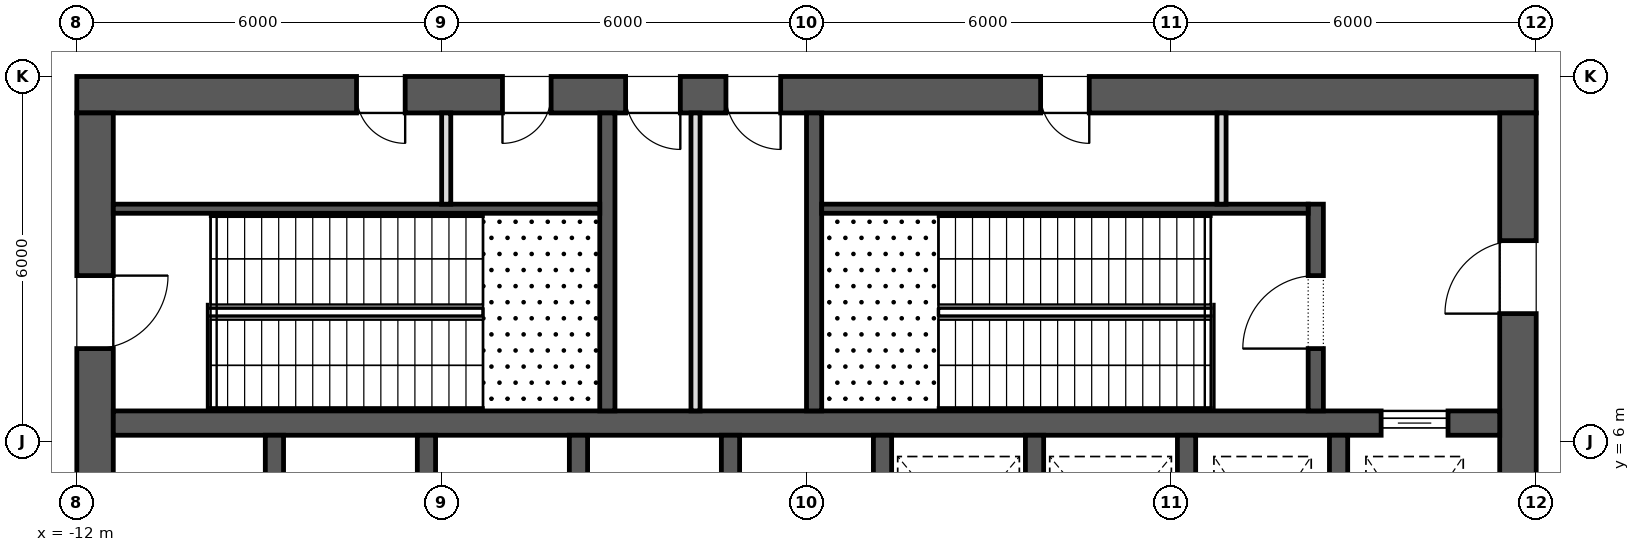
"""IFC4 building model, lengths in metres.
Left out: names, types, materials, properties, quantities, classifications, styles, units other than length and angle.
Written with IfcOpenShell. Run it as: python <this file> out.ifc"""

import sys

from ifc_helpers import new_model, si_unit, direction, frame, frame_2d, origin, place, context, subcontext, project, spatial, rectangle, extrude, element, fill, save


model = new_model("IFC4")
c1 = context("Model", 3, precision=1e-05, world=origin(), true_north=direction((0.0, 1.0)))
c2 = subcontext(c1, "Body", "Model", "MODEL_VIEW")
j1 = project(units=[si_unit("LENGTHUNIT", "METRE"), si_unit("PLANEANGLEUNIT", "RADIAN")], contexts=[c1])
p1 = place(None, origin())
s1 = spatial("IfcSite", under=j1, at=p1, CompositionType="ELEMENT")
p2 = place(p1, origin())
s2 = spatial("IfcBuilding", under=s1, at=p2, CompositionType="ELEMENT")
p3 = place(p2, frame((0.0, 0.0, 167.5)))
s3 = spatial("IfcBuildingStorey", under=s2, at=p3, CompositionType="ELEMENT", Elevation=167.5)
p4 = place(p3, frame((-12.0, 11.7, 0.0), z_axis=(0.0, 0.0, 1.0), x_axis=(1.0, 0.0, 0.0)))
e1 = element("IfcWall", 1, at=p4, inside=s3, PredefinedType="SHEAR", context=c2, shape_type="SweptSolid", body=[
    extrude(rectangle(XDim=24.0, YDim=0.6, at=frame_2d((12.0, 0.0))), origin(), (0.0, 0.0, 1.0), 6.0),
])
p5 = place(p4, frame((9.025, 0.0, 0.0)))
e2 = element("IfcOpeningElement", 2, at=p5, cuts=e1, PredefinedType="OPENING", context=c2, shape_type="SweptSolid", body=[
    extrude(rectangle(XDim=0.9, YDim=2.1, at=frame_2d((0.45, 1.05))), frame((0.0, 0.312, 0.0), z_axis=(0.0, -1.0, 0.0), x_axis=(1.0, 0.0, 0.0)), (0.0, 0.0, 1.0), 0.624),
])
p6 = place(p4, frame((10.675, 0.0, 0.0)))
e3 = element("IfcOpeningElement", 3, at=p6, cuts=e1, PredefinedType="OPENING", context=c2, shape_type="SweptSolid", body=[
    extrude(rectangle(XDim=0.9, YDim=2.1, at=frame_2d((0.45, 1.05))), frame((0.0, 0.312, 0.0), z_axis=(0.0, -1.0, 0.0), x_axis=(1.0, 0.0, 0.0)), (0.0, 0.0, 1.0), 0.624),
])
p7 = place(p4, frame((4.6, 0.0, 0.0)))
e4 = element("IfcOpeningElement", 4, at=p7, cuts=e1, PredefinedType="OPENING", context=c2, shape_type="SweptSolid", body=[
    extrude(rectangle(XDim=0.8, YDim=2.1, at=frame_2d((0.4, 1.05))), frame((0.0, 0.312, 0.0), z_axis=(0.0, -1.0, 0.0), x_axis=(1.0, 0.0, 0.0)), (0.0, 0.0, 1.0), 0.624),
])
p8 = place(p4, frame((7.0, 0.0, 0.0)))
e5 = element("IfcOpeningElement", 5, at=p8, cuts=e1, PredefinedType="OPENING", context=c2, shape_type="SweptSolid", body=[
    extrude(rectangle(XDim=0.8, YDim=2.1, at=frame_2d((0.4, 1.05))), frame((0.0, 0.312, 0.0), z_axis=(0.0, -1.0, 0.0), x_axis=(1.0, 0.0, 0.0)), (0.0, 0.0, 1.0), 0.624),
])
p9 = place(p4, frame((15.85, 0.0, 0.0)))
e6 = element("IfcOpeningElement", 6, at=p9, cuts=e1, PredefinedType="OPENING", context=c2, shape_type="SweptSolid", body=[
    extrude(rectangle(XDim=0.8, YDim=2.1, at=frame_2d((0.4, 1.05))), frame((0.0, 0.312, 0.0), z_axis=(0.0, -1.0, 0.0), x_axis=(1.0, 0.0, 0.0)), (0.0, 0.0, 1.0), 0.624),
])
p10 = place(p3, frame((11.7, -11.4, 0.0), z_axis=(0.0, 0.0, 1.0), x_axis=(0.0, 1.0, 0.0)))
e7 = element("IfcWall", 7, at=p10, inside=s3, PredefinedType="SHEAR", context=c2, shape_type="SweptSolid", body=[
    extrude(rectangle(XDim=22.8, YDim=0.6, at=frame_2d((11.4, 0.0))), origin(), (0.0, 0.0, 1.0), 6.0),
])
p11 = place(p10, frame((10.2, 0.0, 0.0)))
e8 = element("IfcOpeningElement", 8, at=p11, cuts=e7, PredefinedType="OPENING", context=c2, shape_type="SweptSolid", body=[
    extrude(rectangle(XDim=2.4, YDim=2.1, at=frame_2d((1.2, 1.05))), frame((0.0, 0.312, 0.0), z_axis=(0.0, -1.0, 0.0), x_axis=(1.0, 0.0, 0.0)), (0.0, 0.0, 1.0), 0.624),
])
p12 = place(p10, frame((19.5, 0.0, 0.0)))
e9 = element("IfcOpeningElement", 9, at=p12, cuts=e7, PredefinedType="OPENING", context=c2, shape_type="SweptSolid", body=[
    extrude(rectangle(XDim=1.2, YDim=2.1, at=frame_2d((0.6, 1.05))), frame((0.0, 0.312, 0.0), z_axis=(0.0, -1.0, 0.0), x_axis=(1.0, 0.0, 0.0)), (0.0, 0.0, 1.0), 0.624),
])
p13 = place(p10, frame((2.1, 0.0, 0.0)))
e10 = element("IfcOpeningElement", 10, at=p13, cuts=e7, PredefinedType="OPENING", context=c2, shape_type="SweptSolid", body=[
    extrude(rectangle(XDim=1.2, YDim=2.1, at=frame_2d((0.6, 1.05))), frame((0.0, 0.312, 0.0), z_axis=(0.0, -1.0, 0.0), x_axis=(1.0, 0.0, 0.0)), (0.0, 0.0, 1.0), 0.624),
])
p14 = place(p3, frame((-11.7, -11.4, 0.0), z_axis=(0.0, 0.0, 1.0), x_axis=(0.0, 1.0, 0.0)))
e11 = element("IfcWall", 11, at=p14, inside=s3, PredefinedType="SHEAR", context=c2, shape_type="SweptSolid", body=[
    extrude(rectangle(XDim=22.8, YDim=0.6, at=frame_2d((11.4, 0.0))), origin(), (0.0, 0.0, 1.0), 6.0),
])
p15 = place(p14, frame((10.2, 0.0, 0.0)))
e12 = element("IfcOpeningElement", 12, at=p15, cuts=e11, PredefinedType="OPENING", context=c2, shape_type="SweptSolid", body=[
    extrude(rectangle(XDim=2.4, YDim=2.1, at=frame_2d((1.2, 1.05))), frame((0.0, 0.312, 0.0), z_axis=(0.0, -1.0, 0.0), x_axis=(1.0, 0.0, 0.0)), (0.0, 0.0, 1.0), 0.624),
])
p16 = place(p14, frame((18.925, 0.0, 0.0)))
e13 = element("IfcOpeningElement", 13, at=p16, cuts=e11, PredefinedType="OPENING", context=c2, shape_type="SweptSolid", body=[
    extrude(rectangle(XDim=1.2, YDim=2.1, at=frame_2d((0.6, 1.05))), frame((0.0, 0.312, 0.0), z_axis=(0.0, -1.0, 0.0), x_axis=(1.0, 0.0, 0.0)), (0.0, 0.0, 1.0), 0.624),
])
p17 = place(p14, frame((2.675, 0.0, 0.0)))
e14 = element("IfcOpeningElement", 14, at=p17, cuts=e11, PredefinedType="OPENING", context=c2, shape_type="SweptSolid", body=[
    extrude(rectangle(XDim=1.2, YDim=2.1, at=frame_2d((0.6, 1.05))), frame((0.0, 0.312, 0.0), z_axis=(0.0, -1.0, 0.0), x_axis=(1.0, 0.0, 0.0)), (0.0, 0.0, 1.0), 0.624),
])
p18 = place(p3, frame((-11.4, 6.3, 0.0), z_axis=(0.0, 0.0, 1.0), x_axis=(1.0, 0.0, 0.0)))
e15 = element("IfcWall", 15, at=p18, inside=s3, PredefinedType="SHEAR", context=c2, shape_type="SweptSolid", body=[
    extrude(rectangle(XDim=22.8, YDim=0.4, at=frame_2d((11.4, 0.0))), origin(), (0.0, 0.0, 1.0), 6.0),
])
p19 = place(p18, frame((20.85, 0.0, 0.0)))
e16 = element("IfcOpeningElement", 16, at=p19, cuts=e15, PredefinedType="OPENING", context=c2, shape_type="SweptSolid", body=[
    extrude(rectangle(XDim=1.1, YDim=2.1, at=frame_2d((0.55, 1.05))), frame((0.0, 0.212, 0.0), z_axis=(0.0, -1.0, 0.0), x_axis=(1.0, 0.0, 0.0)), (0.0, 0.0, 1.0), 0.424),
])
for number, where, z_axis, x_axis in (
    (17, (-8.75, 3.2, 0.0), (0.0, 0.0, 1.0), (0.0, 1.0, 0.0)),
    (18, (-6.25, 3.2, 0.0), (0.0, 0.0, 1.0), (0.0, 1.0, 0.0)),
    (19, (-3.75, 3.2, 0.0), (0.0, 0.0, 1.0), (0.0, 1.0, 0.0)),
    (20, (-1.25, 3.2, 0.0), (0.0, 0.0, 1.0), (0.0, 1.0, 0.0)),
    (21, (1.25, 3.2, 0.0), (0.0, 0.0, 1.0), (0.0, 1.0, 0.0)),
    (22, (3.75, 3.2, 0.0), (0.0, 0.0, 1.0), (0.0, 1.0, 0.0)),
    (23, (6.25, 3.2, 0.0), (0.0, 0.0, 1.0), (0.0, 1.0, 0.0)),
    (24, (8.75, 3.2, 0.0), (0.0, 0.0, 1.0), (0.0, 1.0, 0.0)),
):
    element("IfcWall", number, at=place(p3, frame(where, z_axis=z_axis, x_axis=x_axis)), inside=s3, PredefinedType="SHEAR", context=c2, shape_type="SweptSolid", body=[
        extrude(rectangle(XDim=2.9, YDim=0.3, at=frame_2d((1.45, 0.0))), origin(), (0.0, 0.0, 1.0), 6.0),
    ])
for number, where, z_axis, x_axis in (
    (25, (-3.275, 6.5, 0.0), (0.0, 0.0, 1.0), (0.0, 1.0, 0.0)),
    (26, (0.125, 6.5, 0.0), (0.0, 0.0, 1.0), (0.0, 1.0, 0.0)),
):
    element("IfcWall", number, at=place(p3, frame(where, z_axis=z_axis, x_axis=x_axis)), inside=s3, PredefinedType="SHEAR", context=c2, shape_type="SweptSolid", body=[
        extrude(rectangle(XDim=4.9, YDim=0.25, at=frame_2d((2.45, 0.0))), origin(), (0.0, 0.0, 1.0), 5.65),
    ])
p20 = place(p3, frame((8.375, 6.5, 0.0), z_axis=(0.0, 0.0, 1.0), x_axis=(0.0, 1.0, 0.0)))
e27 = element("IfcWall", 27, at=p20, inside=s3, PredefinedType="SHEAR", context=c2, shape_type="SweptSolid", body=[
    extrude(rectangle(XDim=3.4, YDim=0.25, at=frame_2d((1.7, 0.0))), origin(), (0.0, 0.0, 1.0), 5.65),
])
p21 = place(p20, frame((1.025, 0.0, 0.0)))
e28 = element("IfcOpeningElement", 28, at=p21, cuts=e27, PredefinedType="OPENING", context=c2, shape_type="SweptSolid", body=[
    extrude(rectangle(XDim=1.2, YDim=2.1, at=frame_2d((0.6, 1.05))), frame((0.0, 0.137, 0.0), z_axis=(0.0, -1.0, 0.0), x_axis=(1.0, 0.0, 0.0)), (0.0, 0.0, 1.0), 0.274),
])
for number, where, z_axis, x_axis in (
    (29, (-11.4, 9.825, 0.0), (0.0, 0.0, 1.0), (1.0, 0.0, 0.0)),
    (30, (0.25, 9.825, 0.0), (0.0, 0.0, 1.0), (1.0, 0.0, 0.0)),
):
    element("IfcWall", number, at=place(p3, frame(where, z_axis=z_axis, x_axis=x_axis)), inside=s3, PredefinedType="SHEAR", context=c2, shape_type="SweptSolid", body=[
        extrude(rectangle(XDim=8.0, YDim=0.15, at=frame_2d((4.0, 0.0))), origin(), (0.0, 0.0, 1.0), 5.65),
    ])
p22 = place(p3, frame((-1.825, 6.5, 0.0), z_axis=(0.0, 0.0, 1.0), x_axis=(0.0, 1.0, 0.0)))
e31 = element("IfcWall", 31, at=p22, inside=s3, PredefinedType="PARTITIONING", context=c2, shape_type="SweptSolid", body=[
    extrude(rectangle(XDim=4.9, YDim=0.15, at=frame_2d((2.45, 0.0))), origin(), (0.0, 0.0, 1.0), 5.65),
])
for number, where, z_axis, x_axis in (
    (32, (-5.925, 9.9, 0.0), (0.0, 0.0, 1.0), (0.0, 1.0, 0.0)),
    (33, (6.825, 9.9, 0.0), (0.0, 0.0, 1.0), (0.0, 1.0, 0.0)),
):
    element("IfcWall", number, at=place(p3, frame(where, z_axis=z_axis, x_axis=x_axis)), inside=s3, PredefinedType="PARTITIONING", context=c2, shape_type="SweptSolid", body=[
        extrude(rectangle(XDim=1.5, YDim=0.15, at=frame_2d((0.75, 0.0))), origin(), (0.0, 0.0, 1.0), 5.65),
    ])
p23 = place(p19, origin())
e34 = element("IfcDoor", 34, at=p23, inside=s3, OperationType="SLIDING_TO_LEFT", PredefinedType="DOOR", context=c2, shape_type="SweptSolid", body=[
    extrude(rectangle(XDim=1.1, YDim=2.1, at=frame_2d((0.55, 1.05))), frame((0.0, 0.025, 0.0), z_axis=(0.0, -1.0, 0.0), x_axis=(1.0, 0.0, 0.0)), (0.0, 0.0, 1.0), 0.05),
])
fill(e16, e34)
p24 = place(p16, frame((1.2, 0.0, 0.0), z_axis=(0.0, 0.0, 1.0), x_axis=(-1.0, 0.0, 0.0)))
e35 = element("IfcDoor", 35, at=p24, inside=s3, OperationType="SINGLE_SWING_RIGHT", PredefinedType="DOOR", context=c2, shape_type="SweptSolid", body=[
    extrude(rectangle(XDim=1.2, YDim=2.1, at=frame_2d((0.6, 1.05))), frame((0.0, 0.025, 0.0), z_axis=(0.0, -1.0, 0.0), x_axis=(1.0, 0.0, 0.0)), (0.0, 0.0, 1.0), 0.05),
])
fill(e13, e35)
p25 = place(p21, origin())
e36 = element("IfcDoor", 36, at=p25, inside=s3, OperationType="SINGLE_SWING_RIGHT", PredefinedType="DOOR", context=c2, shape_type="SweptSolid", body=[
    extrude(rectangle(XDim=1.2, YDim=2.1, at=frame_2d((0.6, 1.05))), frame((0.0, 0.025, 0.0), z_axis=(0.0, -1.0, 0.0), x_axis=(1.0, 0.0, 0.0)), (0.0, 0.0, 1.0), 0.05),
])
fill(e28, e36)
p26 = place(p12, origin())
e37 = element("IfcDoor", 37, at=p26, inside=s3, OperationType="SINGLE_SWING_RIGHT", PredefinedType="DOOR", context=c2, shape_type="SweptSolid", body=[
    extrude(rectangle(XDim=1.2, YDim=2.1, at=frame_2d((0.6, 1.05))), frame((0.0, 0.025, 0.0), z_axis=(0.0, -1.0, 0.0), x_axis=(1.0, 0.0, 0.0)), (0.0, 0.0, 1.0), 0.05),
])
fill(e9, e37)
p27 = place(p5, frame((0.9, 0.0, 0.0), z_axis=(0.0, 0.0, 1.0), x_axis=(-1.0, 0.0, 0.0)))
e38 = element("IfcDoor", 38, at=p27, inside=s3, OperationType="SINGLE_SWING_RIGHT", PredefinedType="DOOR", context=c2, shape_type="SweptSolid", body=[
    extrude(rectangle(XDim=0.9, YDim=2.1, at=frame_2d((0.45, 1.05))), frame((0.0, 0.025, 0.0), z_axis=(0.0, -1.0, 0.0), x_axis=(1.0, 0.0, 0.0)), (0.0, 0.0, 1.0), 0.05),
])
fill(e2, e38)
p28 = place(p6, frame((0.9, 0.0, 0.0), z_axis=(0.0, 0.0, 1.0), x_axis=(-1.0, 0.0, 0.0)))
e39 = element("IfcDoor", 39, at=p28, inside=s3, OperationType="SINGLE_SWING_RIGHT", PredefinedType="DOOR", context=c2, shape_type="SweptSolid", body=[
    extrude(rectangle(XDim=0.9, YDim=2.1, at=frame_2d((0.45, 1.05))), frame((0.0, 0.025, 0.0), z_axis=(0.0, -1.0, 0.0), x_axis=(1.0, 0.0, 0.0)), (0.0, 0.0, 1.0), 0.05),
])
fill(e3, e39)
p29 = place(p7, frame((0.8, 0.0, 0.0), z_axis=(0.0, 0.0, 1.0), x_axis=(-1.0, 0.0, 0.0)))
e40 = element("IfcDoor", 40, at=p29, inside=s3, OperationType="SINGLE_SWING_RIGHT", PredefinedType="DOOR", context=c2, shape_type="SweptSolid", body=[
    extrude(rectangle(XDim=0.8, YDim=2.1, at=frame_2d((0.4, 1.05))), frame((0.0, 0.025, 0.0), z_axis=(0.0, -1.0, 0.0), x_axis=(1.0, 0.0, 0.0)), (0.0, 0.0, 1.0), 0.05),
])
fill(e4, e40)
p30 = place(p8, frame((0.8, 0.0, 0.0), z_axis=(0.0, 0.0, 1.0), x_axis=(-1.0, 0.0, 0.0)))
e41 = element("IfcDoor", 41, at=p30, inside=s3, OperationType="SINGLE_SWING_LEFT", PredefinedType="DOOR", context=c2, shape_type="SweptSolid", body=[
    extrude(rectangle(XDim=0.8, YDim=2.1, at=frame_2d((0.4, 1.05))), frame((0.0, 0.025, 0.0), z_axis=(0.0, -1.0, 0.0), x_axis=(1.0, 0.0, 0.0)), (0.0, 0.0, 1.0), 0.05),
])
fill(e5, e41)
p31 = place(p9, frame((0.8, 0.0, 0.0), z_axis=(0.0, 0.0, 1.0), x_axis=(-1.0, 0.0, 0.0)))
e42 = element("IfcDoor", 42, at=p31, inside=s3, OperationType="SINGLE_SWING_RIGHT", PredefinedType="DOOR", context=c2, shape_type="SweptSolid", body=[
    extrude(rectangle(XDim=0.8, YDim=2.1, at=frame_2d((0.4, 1.05))), frame((0.0, 0.025, 0.0), z_axis=(0.0, -1.0, 0.0), x_axis=(1.0, 0.0, 0.0)), (0.0, 0.0, 1.0), 0.05),
])
fill(e6, e42)
save(model, sys.argv[1])
